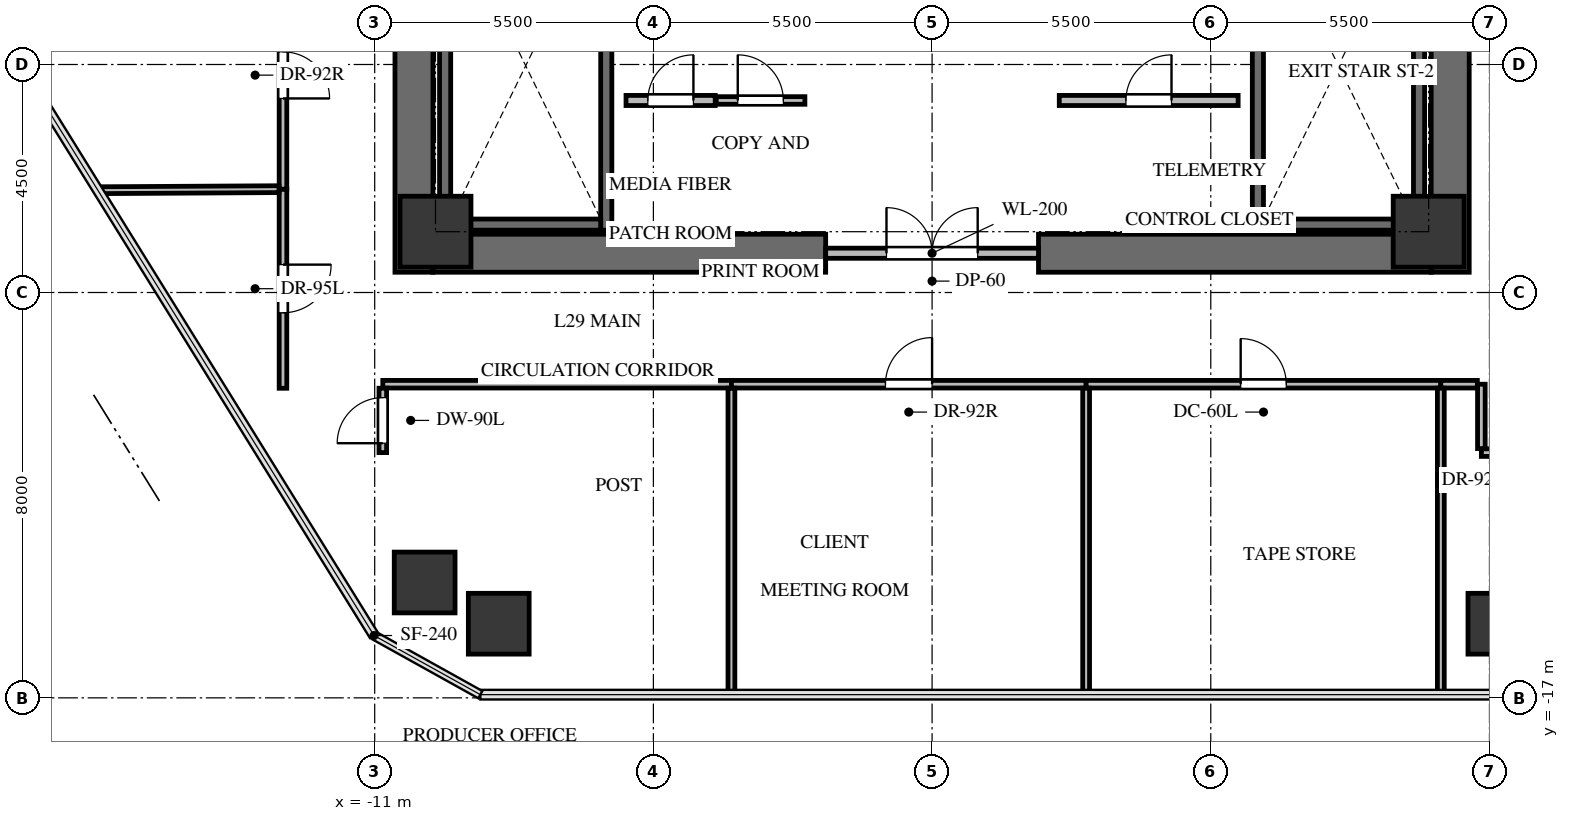
"""IFC4 building model, lengths in metres.
Left out: names, types, materials, properties, quantities, classifications, styles, units other than length and angle.
Written with IfcOpenShell. Run it as: python <this file> out.ifc"""

import sys

from ifc_helpers import new_model, si_unit, direction, frame, frame_2d, origin, origin_2d, place, context, subcontext, project, spatial, rectangle, extrude, source, transform, mapped, element, fill, save


model = new_model("IFC4")
c1 = context("Model", 3, precision=1e-05, world=origin(), true_north=direction((0.0, 1.0)))
c2 = subcontext(c1, "Body", "Model", "MODEL_VIEW")
j1 = project(units=[si_unit("LENGTHUNIT", "METRE"), si_unit("PLANEANGLEUNIT", "RADIAN")], contexts=[c1])
p1 = place(None, origin())
s1 = spatial("IfcSite", under=j1, at=p1, CompositionType="ELEMENT")
p2 = place(p1, origin())
s2 = spatial("IfcBuilding", under=s1, at=p2, CompositionType="ELEMENT")
p3 = place(p2, frame((0.0, 0.0, 110.7)))
s3 = spatial("IfcBuildingStorey", under=s2, at=p3, CompositionType="ELEMENT", Elevation=110.7)
for number, where, z_axis, x_axis in (
    (1, (-10.225, -8.6, 0.0), (0.0, 0.0, 1.0), (0.0, 1.0, 0.0)),
    (2, (10.225, -8.6, 0.0), (0.0, 0.0, 1.0), (0.0, 1.0, 0.0)),
):
    element("IfcWall", number, at=place(p3, frame(where, z_axis=z_axis, x_axis=x_axis)), inside=s3, PredefinedType="SHEAR", context=c2, shape_type="SweptSolid", body=[
        extrude(rectangle(XDim=17.2, YDim=0.75, at=frame_2d((8.6, 0.0))), origin(), (0.0, 0.0, 1.0), 3.3),
    ])
for number, where, z_axis, x_axis in (
    (3, (-9.85, -8.225, 0.0), (0.0, 0.0, 1.0), (1.0, 0.0, 0.0)),
    (4, (2.1, -8.225, 0.0), (0.0, 0.0, 1.0), (1.0, 0.0, 0.0)),
):
    element("IfcWall", number, at=place(p3, frame(where, z_axis=z_axis, x_axis=x_axis)), inside=s3, PredefinedType="SHEAR", context=c2, shape_type="SweptSolid", body=[
        extrude(rectangle(XDim=7.75, YDim=0.75, at=frame_2d((3.875, 0.0))), origin(), (0.0, 0.0, 1.0), 3.3),
    ])
p4 = place(p3, frame((-6.43, -7.77, -0.24), z_axis=(0.0, 0.0, 1.0), x_axis=(0.0, 1.0, 0.0)))
e5 = element("IfcWall", 5, at=p4, inside=s3, PredefinedType="SHEAR", context=c2, shape_type="SweptSolid", body=[
    extrude(rectangle(XDim=7.89, YDim=0.22, at=frame_2d((3.945, 0.0))), origin(), (0.0, 0.0, 1.0), 3.3),
])
p5 = place(p4, frame((6.32, 0.0, 0.0)))
e6 = element("IfcOpeningElement", 6, at=p5, cuts=e5, PredefinedType="OPENING", context=c2, shape_type="SweptSolid", body=[
    extrude(rectangle(XDim=1.05, YDim=2.15, at=frame_2d((0.525, 1.075))), frame((0.0, 0.12, 0.0), z_axis=(0.0, -1.0, 0.0), x_axis=(1.0, 0.0, 0.0)), (0.0, 0.0, 1.0), 0.24),
])
p6 = place(p3, frame((-9.61, 0.12, -0.24), z_axis=(0.0, 0.0, 1.0), x_axis=(0.0, -1.0, 0.0)))
e7 = element("IfcWall", 7, at=p6, inside=s3, PredefinedType="SHEAR", context=c2, shape_type="SweptSolid", body=[
    extrude(rectangle(XDim=7.89, YDim=0.22, at=frame_2d((3.945, 0.0))), origin(), (0.0, 0.0, 1.0), 3.3),
])
p7 = place(p3, frame((-9.5, -7.66, -0.24), z_axis=(0.0, 0.0, 1.0), x_axis=(1.0, 0.0, 0.0)))
e8 = element("IfcWall", 8, at=p7, inside=s3, PredefinedType="SHEAR", context=c2, shape_type="SweptSolid", body=[
    extrude(rectangle(XDim=2.96, YDim=0.22, at=frame_2d((1.48, 0.0))), origin(), (0.0, 0.0, 1.0), 3.3),
])
p8 = place(p3, frame((9.61, -7.77, -0.24), z_axis=(0.0, 0.0, 1.0), x_axis=(0.0, 1.0, 0.0)))
e9 = element("IfcWall", 9, at=p8, inside=s3, PredefinedType="SHEAR", context=c2, shape_type="SweptSolid", body=[
    extrude(rectangle(XDim=7.89, YDim=0.22, at=frame_2d((3.945, 0.0))), origin(), (0.0, 0.0, 1.0), 3.3),
])
p9 = place(p3, frame((6.43, 0.12, -0.24), z_axis=(0.0, 0.0, 1.0), x_axis=(0.0, -1.0, 0.0)))
e10 = element("IfcWall", 10, at=p9, inside=s3, PredefinedType="SHEAR", context=c2, shape_type="SweptSolid", body=[
    extrude(rectangle(XDim=7.89, YDim=0.22, at=frame_2d((3.945, 0.0))), origin(), (0.0, 0.0, 1.0), 3.3),
])
p10 = place(p9, frame((0.52, 0.0, 0.0)))
e11 = element("IfcOpeningElement", 11, at=p10, cuts=e10, PredefinedType="OPENING", context=c2, shape_type="SweptSolid", body=[
    extrude(rectangle(XDim=1.05, YDim=2.15, at=frame_2d((0.525, 1.075))), frame((0.0, 0.12, 0.0), z_axis=(0.0, -1.0, 0.0), x_axis=(1.0, 0.0, 0.0)), (0.0, 0.0, 1.0), 0.24),
])
p11 = place(p3, frame((6.54, -7.66, -0.24), z_axis=(0.0, 0.0, 1.0), x_axis=(1.0, 0.0, 0.0)))
e12 = element("IfcWall", 12, at=p11, inside=s3, PredefinedType="SHEAR", context=c2, shape_type="SweptSolid", body=[
    extrude(rectangle(XDim=2.96, YDim=0.22, at=frame_2d((1.48, 0.0))), origin(), (0.0, 0.0, 1.0), 3.3),
])
m1 = source(origin(), c2, "Body", "SweptSolid", [
    extrude(rectangle(XDim=1.4, YDim=1.4, at=origin_2d()), origin(), (0.0, 0.0, 1.0), 3.3),
])
for number, where, z_axis, x_axis in (
    (13, (-9.8, -7.8, -0.24), (0.0, 0.0, 1.0), (1.0, 0.0, 0.0)),
    (14, (9.8, -7.8, -0.24), (0.0, 0.0, 1.0), (1.0, 0.0, 0.0)),
):
    element("IfcColumn", number, at=place(p3, frame(where, z_axis=z_axis, x_axis=x_axis)), inside=s3, PredefinedType="COLUMN", context=c2, shape_type="MappedRepresentation", body=[
        mapped(m1, transform((0.0, 0.0, 0.0), x_axis=(1.0, 0.0, 0.0), y_axis=(0.0, 1.0, 0.0), z_axis=(0.0, 0.0, 1.0), scale=1.0)),
    ])
m2 = source(origin(), c2, "Body", "SweptSolid", [
    extrude(rectangle(XDim=1.2, YDim=1.2, at=origin_2d()), origin(), (0.0, 0.0, 1.0), 3.3),
])
for number, where, z_axis, x_axis in (
    (15, (-10.014, -14.723, -0.24), (0.0, 0.0, 1.0), (1.0, 0.0, 0.0)),
    (16, (11.176, -15.537, -0.24), (0.0, 0.0, 1.0), (1.0, 0.0, 0.0)),
    (17, (-8.552, -15.537, -0.24), (0.0, 0.0, 1.0), (1.0, 0.0, 0.0)),
):
    element("IfcColumn", number, at=place(p3, frame(where, z_axis=z_axis, x_axis=x_axis)), inside=s3, PredefinedType="COLUMN", context=c2, shape_type="MappedRepresentation", body=[
        mapped(m2, transform((0.0, 0.0, 0.0), x_axis=(1.0, 0.0, 0.0), y_axis=(0.0, 1.0, 0.0), z_axis=(0.0, 0.0, 1.0), scale=1.0)),
    ])
p12 = place(p3, frame((-2.1, -8.225, 0.0), z_axis=(0.0, 0.0, 1.0), x_axis=(1.0, 0.0, 0.0)))
e18 = element("IfcWall", 18, at=p12, inside=s3, PredefinedType="SOLIDWALL", context=c2, shape_type="SweptSolid", body=[
    extrude(rectangle(XDim=4.2, YDim=0.2, at=frame_2d((2.1, 0.0))), origin(), (0.0, 0.0, 1.0), 3.045),
])
p13 = place(p12, frame((1.2, 0.0, 0.0)))
e19 = element("IfcOpeningElement", 19, at=p13, cuts=e18, PredefinedType="OPENING", context=c2, shape_type="SweptSolid", body=[
    extrude(rectangle(XDim=1.8, YDim=2.15, at=frame_2d((0.9, 1.075))), frame((0.0, 0.11, 0.0), z_axis=(0.0, -1.0, 0.0), x_axis=(1.0, 0.0, 0.0)), (0.0, 0.0, 1.0), 0.22),
])
p14 = place(p3, frame((-6.04, -5.21, 0.0), z_axis=(0.0, 0.0, 1.0), x_axis=(1.0, 0.0, 0.0)))
e20 = element("IfcWall", 20, at=p14, inside=s3, PredefinedType="SOLIDWALL", context=c2, shape_type="SweptSolid", body=[
    extrude(rectangle(XDim=1.76, YDim=0.2, at=frame_2d((0.88, 0.0))), origin(), (0.0, 0.0, 1.0), 3.045),
])
p15 = place(p14, frame((0.43, 0.0, 0.0)))
e21 = element("IfcOpeningElement", 21, at=p15, cuts=e20, PredefinedType="OPENING", context=c2, shape_type="SweptSolid", body=[
    extrude(rectangle(XDim=0.9, YDim=2.05, at=frame_2d((0.45, 1.025))), frame((0.0, 0.11, 0.0), z_axis=(0.0, -1.0, 0.0), x_axis=(1.0, 0.0, 0.0)), (0.0, 0.0, 1.0), 0.22),
])
p16 = place(p3, frame((-4.26, -5.21, 0.0), z_axis=(0.0, 0.0, 1.0), x_axis=(1.0, 0.0, 0.0)))
e22 = element("IfcWall", 22, at=p16, inside=s3, PredefinedType="PARTITIONING", context=c2, shape_type="SweptSolid", body=[
    extrude(rectangle(XDim=1.75, YDim=0.15, at=frame_2d((0.875, 0.0))), origin(), (0.0, 0.0, 1.0), 3.045),
])
p17 = place(p16, frame((0.425, 0.0, 0.0)))
e23 = element("IfcOpeningElement", 23, at=p17, cuts=e22, PredefinedType="OPENING", context=c2, shape_type="SweptSolid", body=[
    extrude(rectangle(XDim=0.9, YDim=2.05, at=frame_2d((0.45, 1.025))), frame((0.0, 0.085, 0.0), z_axis=(0.0, -1.0, 0.0), x_axis=(1.0, 0.0, 0.0)), (0.0, 0.0, 1.0), 0.17),
])
p18 = place(p3, frame((2.51, -5.21, 0.0), z_axis=(0.0, 0.0, 1.0), x_axis=(1.0, 0.0, 0.0)))
e24 = element("IfcWall", 24, at=p18, inside=s3, PredefinedType="SOLIDWALL", context=c2, shape_type="SweptSolid", body=[
    extrude(rectangle(XDim=3.53, YDim=0.2, at=frame_2d((1.765, 0.0))), origin(), (0.0, 0.0, 1.0), 3.045),
])
p19 = place(p18, frame((1.315, 0.0, 0.0)))
e25 = element("IfcOpeningElement", 25, at=p19, cuts=e24, PredefinedType="OPENING", context=c2, shape_type="SweptSolid", body=[
    extrude(rectangle(XDim=0.9, YDim=2.05, at=frame_2d((0.45, 1.025))), frame((0.0, 0.11, 0.0), z_axis=(0.0, -1.0, 0.0), x_axis=(1.0, 0.0, 0.0)), (0.0, 0.0, 1.0), 0.22),
])
p20 = place(p3, frame((-10.84, -10.81, 0.0), z_axis=(0.0, 0.0, 1.0), x_axis=(1.0, 0.0, 0.0)))
e26 = element("IfcWall", 26, at=p20, inside=s3, PredefinedType="PARTITIONING", context=c2, shape_type="SweptSolid", body=[
    extrude(rectangle(XDim=6.88, YDim=0.15, at=frame_2d((3.44, 0.0))), origin(), (0.0, 0.0, 1.0), 2.212),
])
p21 = place(p3, frame((-10.84, -12.16, 0.0), z_axis=(0.0, 0.0, 1.0), x_axis=(0.0, 1.0, 0.0)))
e27 = element("IfcWall", 27, at=p21, inside=s3, PredefinedType="PARTITIONING", context=c2, shape_type="SweptSolid", body=[
    extrude(rectangle(XDim=1.271, YDim=0.15, at=frame_2d((0.635, 0.0))), origin(), (0.0, 0.0, 1.0), 3.045),
])
p22 = place(p21, frame((0.186, 0.0, 0.0)))
e28 = element("IfcOpeningElement", 28, at=p22, cuts=e27, PredefinedType="OPENING", context=c2, shape_type="SweptSolid", body=[
    extrude(rectangle(XDim=0.9, YDim=2.05, at=frame_2d((0.45, 1.025))), frame((0.0, 0.085, 0.0), z_axis=(0.0, -1.0, 0.0), x_axis=(1.0, 0.0, 0.0)), (0.0, 0.0, 1.0), 0.17),
])
p23 = place(p3, frame((-3.96, -10.81, 0.0), z_axis=(0.0, 0.0, 1.0), x_axis=(1.0, 0.0, 0.0)))
e29 = element("IfcWall", 29, at=p23, inside=s3, PredefinedType="PARTITIONING", context=c2, shape_type="SweptSolid", body=[
    extrude(rectangle(XDim=7.0, YDim=0.15, at=frame_2d((3.5, 0.0))), origin(), (0.0, 0.0, 1.0), 3.045),
])
p24 = place(p23, frame((3.04, 0.0, 0.0)))
e30 = element("IfcOpeningElement", 30, at=p24, cuts=e29, PredefinedType="OPENING", context=c2, shape_type="SweptSolid", body=[
    extrude(rectangle(XDim=0.92, YDim=2.1, at=frame_2d((0.46, 1.05))), frame((0.0, 0.085, 0.0), z_axis=(0.0, -1.0, 0.0), x_axis=(1.0, 0.0, 0.0)), (0.0, 0.0, 1.0), 0.17),
])
p25 = place(p3, frame((3.04, -10.81, 0.0), z_axis=(0.0, 0.0, 1.0), x_axis=(1.0, 0.0, 0.0)))
e31 = element("IfcWall", 31, at=p25, inside=s3, PredefinedType="PARTITIONING", context=c2, shape_type="SweptSolid", body=[
    extrude(rectangle(XDim=7.0, YDim=0.15, at=frame_2d((3.5, 0.0))), origin(), (0.0, 0.0, 1.0), 2.212),
])
p26 = place(p25, frame((3.05, 0.0, 0.0)))
e32 = element("IfcOpeningElement", 32, at=p26, cuts=e31, PredefinedType="OPENING", context=c2, shape_type="SweptSolid", body=[
    extrude(rectangle(XDim=0.9, YDim=2.05, at=frame_2d((0.45, 1.025))), frame((0.0, 0.085, 0.0), z_axis=(0.0, -1.0, 0.0), x_axis=(1.0, 0.0, 0.0)), (0.0, 0.0, 1.0), 0.17),
])
p27 = place(p3, frame((10.84, -12.16, 0.0), z_axis=(0.0, 0.0, 1.0), x_axis=(1.0, 0.0, 0.0)))
e33 = element("IfcWall", 33, at=p27, inside=s3, PredefinedType="PARTITIONING", context=c2, shape_type="SweptSolid", body=[
    extrude(rectangle(XDim=1.97, YDim=0.15, at=frame_2d((0.985, 0.0))), origin(), (0.0, 0.0, 1.0), 3.045),
])
p28 = place(p27, frame((0.525, 0.0, 0.0)))
e34 = element("IfcOpeningElement", 34, at=p28, cuts=e33, PredefinedType="OPENING", context=c2, shape_type="SweptSolid", body=[
    extrude(rectangle(XDim=0.92, YDim=2.1, at=frame_2d((0.46, 1.05))), frame((0.0, 0.085, 0.0), z_axis=(0.0, -1.0, 0.0), x_axis=(1.0, 0.0, 0.0)), (0.0, 0.0, 1.0), 0.17),
])
p29 = place(p3, frame((10.84, -10.81, 0.0), z_axis=(0.0, 0.0, 1.0), x_axis=(0.0, -1.0, 0.0)))
e35 = element("IfcWall", 35, at=p29, inside=s3, PredefinedType="PARTITIONING", context=c2, shape_type="SweptSolid", body=[
    extrude(rectangle(XDim=1.271, YDim=0.15, at=frame_2d((0.635, 0.0))), origin(), (0.0, 0.0, 1.0), 3.045),
])
p30 = place(p3, frame((10.04, -10.81, 0.0), z_axis=(0.0, 0.0, 1.0), x_axis=(1.0, 0.0, 0.0)))
e36 = element("IfcWall", 36, at=p30, inside=s3, PredefinedType="PARTITIONING", context=c2, shape_type="SweptSolid", body=[
    extrude(rectangle(XDim=0.721, YDim=0.15, at=frame_2d((0.36, 0.0))), origin(), (0.0, 0.0, 1.0), 3.045),
])
p31 = place(p3, frame((-12.81, -6.96, 0.0), z_axis=(0.0, 0.0, 1.0), x_axis=(0.0, -1.0, 0.0)))
e37 = element("IfcWall", 37, at=p31, inside=s3, PredefinedType="PARTITIONING", context=c2, shape_type="SweptSolid", body=[
    extrude(rectangle(XDim=3.93, YDim=0.15, at=frame_2d((1.965, 0.0))), origin(), (0.0, 0.0, 1.0), 2.38),
])
p32 = place(p31, frame((1.49, 0.0, 0.0)))
e38 = element("IfcOpeningElement", 38, at=p32, cuts=e37, PredefinedType="OPENING", context=c2, shape_type="SweptSolid", body=[
    extrude(rectangle(XDim=0.95, YDim=2.1, at=frame_2d((0.475, 1.05))), frame((0.0, 0.085, 0.0), z_axis=(0.0, -1.0, 0.0), x_axis=(1.0, 0.0, 0.0)), (0.0, 0.0, 1.0), 0.17),
])
p33 = place(p3, frame((-12.81, -2.46, 0.0), z_axis=(0.0, 0.0, 1.0), x_axis=(0.0, -1.0, 0.0)))
e39 = element("IfcWall", 39, at=p33, inside=s3, PredefinedType="PARTITIONING", context=c2, shape_type="SweptSolid", body=[
    extrude(rectangle(XDim=4.5, YDim=0.15, at=frame_2d((2.25, 0.0))), origin(), (0.0, 0.0, 1.0), 3.045),
])
p34 = place(p33, frame((1.79, 0.0, 0.0)))
e40 = element("IfcOpeningElement", 40, at=p34, cuts=e39, PredefinedType="OPENING", context=c2, shape_type="SweptSolid", body=[
    extrude(rectangle(XDim=0.92, YDim=2.1, at=frame_2d((0.46, 1.05))), frame((0.0, 0.085, 0.0), z_axis=(0.0, -1.0, 0.0), x_axis=(1.0, 0.0, 0.0)), (0.0, 0.0, 1.0), 0.17),
])
for number, where, z_axis, x_axis in (
    (41, (-3.96, -10.889, 0.0), (0.0, 0.0, 1.0), (0.0, -1.0, 0.0)),
    (42, (3.04, -10.889, 0.0), (0.0, 0.0, 1.0), (0.0, -1.0, 0.0)),
):
    element("IfcWall", number, at=place(p3, frame(where, z_axis=z_axis, x_axis=x_axis)), inside=s3, PredefinedType="PARTITIONING", context=c2, shape_type="SweptSolid", body=[
        extrude(rectangle(XDim=6.048, YDim=0.135, at=frame_2d((3.024, 0.0))), origin(), (0.0, 0.0, 1.0), 2.38),
    ])
p35 = place(p3, frame((10.04, -10.889, 0.0), z_axis=(0.0, 0.0, 1.0), x_axis=(0.0, -1.0, 0.0)))
e43 = element("IfcWall", 43, at=p35, inside=s3, PredefinedType="PARTITIONING", context=c2, shape_type="SweptSolid", body=[
    extrude(rectangle(XDim=6.048, YDim=0.135, at=frame_2d((3.024, 0.0))), origin(), (0.0, 0.0, 1.0), 2.212),
])
p36 = place(p3, frame((-16.464, -6.981, 0.0), z_axis=(0.0, 0.0, 1.0), x_axis=(0.99998315245, 0.005804723619, 0.0)))
e44 = element("IfcWall", 44, at=p36, inside=s3, PredefinedType="PARTITIONING", context=c2, shape_type="SweptSolid", body=[
    extrude(rectangle(XDim=3.575, YDim=0.135, at=frame_2d((1.788, 0.0))), origin(), (0.0, 0.0, 1.0), 2.38),
])
m3 = source(origin(), c2, "Body", "SweptSolid", [
    extrude(rectangle(XDim=1.8, YDim=2.15, at=frame_2d((0.9, 1.075))), frame((0.0, 0.025, 0.0), z_axis=(0.0, -1.0, 0.0), x_axis=(1.0, 0.0, 0.0)), (0.0, 0.0, 1.0), 0.05),
])
p37 = place(p13, origin())
e45 = element("IfcDoor", 45, at=p37, inside=s3, OperationType="DOUBLE_DOOR_SINGLE_SWING", PredefinedType="DOOR", context=c2, shape_type="MappedRepresentation", body=[
    mapped(m3, transform((0.0, 0.0, 0.0), x_axis=(1.0, 0.0, 0.0), y_axis=(0.0, 1.0, 0.0), z_axis=(0.0, 0.0, 1.0), scale=1.0)),
])
fill(e19, e45)
m4 = source(origin(), c2, "Body", "SweptSolid", [
    extrude(rectangle(XDim=0.9, YDim=2.05, at=frame_2d((0.45, 1.025))), frame((0.0, 0.025, 0.0), z_axis=(0.0, -1.0, 0.0), x_axis=(1.0, 0.0, 0.0)), (0.0, 0.0, 1.0), 0.05),
])
p38 = place(p15, origin())
e46 = element("IfcDoor", 46, at=p38, inside=s3, OperationType="SINGLE_SWING_RIGHT", PredefinedType="DOOR", context=c2, shape_type="MappedRepresentation", body=[
    mapped(m4, transform((0.0, 0.0, 0.0), x_axis=(1.0, 0.0, 0.0), y_axis=(0.0, 1.0, 0.0), z_axis=(0.0, 0.0, 1.0), scale=1.0)),
])
fill(e21, e46)
m5 = source(origin(), c2, "Body", "SweptSolid", [
    extrude(rectangle(XDim=0.9, YDim=2.05, at=frame_2d((0.45, 1.025))), frame((0.0, 0.025, 0.0), z_axis=(0.0, -1.0, 0.0), x_axis=(1.0, 0.0, 0.0)), (0.0, 0.0, 1.0), 0.05),
])
p39 = place(p17, origin())
e47 = element("IfcDoor", 47, at=p39, inside=s3, OperationType="SINGLE_SWING_LEFT", PredefinedType="DOOR", context=c2, shape_type="MappedRepresentation", body=[
    mapped(m5, transform((0.0, 0.0, 0.0), x_axis=(1.0, 0.0, 0.0), y_axis=(0.0, 1.0, 0.0), z_axis=(0.0, 0.0, 1.0), scale=1.0)),
])
fill(e23, e47)
p40 = place(p19, origin())
e48 = element("IfcDoor", 48, at=p40, inside=s3, OperationType="SINGLE_SWING_RIGHT", PredefinedType="DOOR", context=c2, shape_type="MappedRepresentation", body=[
    mapped(m4, transform((0.0, 0.0, 0.0), x_axis=(1.0, 0.0, 0.0), y_axis=(0.0, 1.0, 0.0), z_axis=(0.0, 0.0, 1.0), scale=1.0)),
])
fill(e25, e48)
m6 = source(origin(), c2, "Body", "SweptSolid", [
    extrude(rectangle(XDim=0.9, YDim=2.05, at=frame_2d((0.45, 1.025))), frame((0.0, 0.025, 0.0), z_axis=(0.0, -1.0, 0.0), x_axis=(1.0, 0.0, 0.0)), (0.0, 0.0, 1.0), 0.05),
])
p41 = place(p22, origin())
e49 = element("IfcDoor", 49, at=p41, inside=s3, OperationType="SINGLE_SWING_LEFT", PredefinedType="DOOR", context=c2, shape_type="MappedRepresentation", body=[
    mapped(m6, transform((0.0, 0.0, 0.0), x_axis=(1.0, 0.0, 0.0), y_axis=(0.0, 1.0, 0.0), z_axis=(0.0, 0.0, 1.0), scale=1.0)),
])
fill(e28, e49)
m7 = source(origin(), c2, "Body", "SweptSolid", [
    extrude(rectangle(XDim=0.92, YDim=2.1, at=frame_2d((0.46, 1.05))), frame((0.0, 0.025, 0.0), z_axis=(0.0, -1.0, 0.0), x_axis=(1.0, 0.0, 0.0)), (0.0, 0.0, 1.0), 0.05),
])
p42 = place(p24, origin())
e50 = element("IfcDoor", 50, at=p42, inside=s3, OperationType="SINGLE_SWING_RIGHT", PredefinedType="DOOR", context=c2, shape_type="MappedRepresentation", body=[
    mapped(m7, transform((0.0, 0.0, 0.0), x_axis=(1.0, 0.0, 0.0), y_axis=(0.0, 1.0, 0.0), z_axis=(0.0, 0.0, 1.0), scale=1.0)),
])
fill(e30, e50)
p43 = place(p26, origin())
e51 = element("IfcDoor", 51, at=p43, inside=s3, OperationType="SINGLE_SWING_LEFT", PredefinedType="DOOR", context=c2, shape_type="MappedRepresentation", body=[
    mapped(m5, transform((0.0, 0.0, 0.0), x_axis=(1.0, 0.0, 0.0), y_axis=(0.0, 1.0, 0.0), z_axis=(0.0, 0.0, 1.0), scale=1.0)),
])
fill(e32, e51)
m8 = source(origin(), c2, "Body", "SweptSolid", [
    extrude(rectangle(XDim=0.95, YDim=2.1, at=frame_2d((0.475, 1.05))), frame((0.0, 0.025, 0.0), z_axis=(0.0, -1.0, 0.0), x_axis=(1.0, 0.0, 0.0)), (0.0, 0.0, 1.0), 0.05),
])
p44 = place(p32, origin())
e52 = element("IfcDoor", 52, at=p44, inside=s3, OperationType="SINGLE_SWING_LEFT", PredefinedType="DOOR", context=c2, shape_type="MappedRepresentation", body=[
    mapped(m8, transform((0.0, 0.0, 0.0), x_axis=(1.0, 0.0, 0.0), y_axis=(0.0, 1.0, 0.0), z_axis=(0.0, 0.0, 1.0), scale=1.0)),
])
fill(e38, e52)
p45 = place(p34, origin())
e53 = element("IfcDoor", 53, at=p45, inside=s3, OperationType="SINGLE_SWING_RIGHT", PredefinedType="DOOR", context=c2, shape_type="MappedRepresentation", body=[
    mapped(m7, transform((0.0, 0.0, 0.0), x_axis=(1.0, 0.0, 0.0), y_axis=(0.0, 1.0, 0.0), z_axis=(0.0, 0.0, 1.0), scale=1.0)),
])
fill(e40, e53)
save(model, sys.argv[1])
